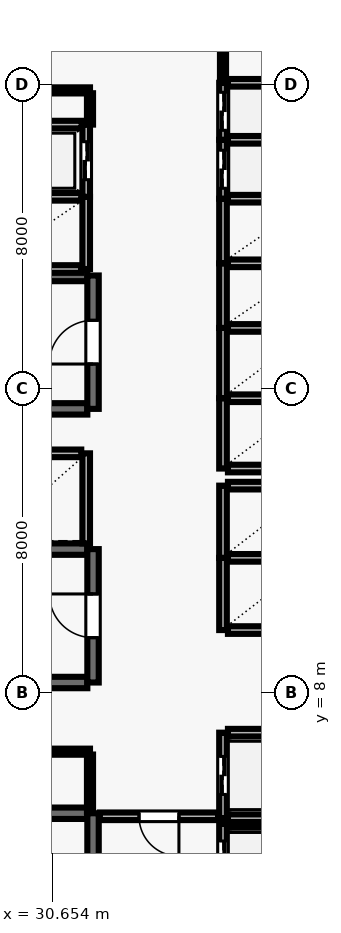
"""IFC4 building model, lengths in metres.
Left out: names, types, materials, properties, quantities, classifications, styles, units other than length and angle.
Written with IfcOpenShell. Run it as: python <this file> out.ifc"""

import sys

from ifc_helpers import new_model, si_unit, direction, frame, frame_2d, origin, place, context, subcontext, project, spatial, rectangle, extrude, element, fill, save


model = new_model("IFC4")
c1 = context("Model", 3, precision=1e-05, world=origin(), true_north=direction((0.0, 1.0)))
c2 = subcontext(c1, "Body", "Model", "MODEL_VIEW")
j1 = project(units=[si_unit("LENGTHUNIT", "METRE"), si_unit("PLANEANGLEUNIT", "RADIAN")], contexts=[c1])
p1 = place(None, origin())
s1 = spatial("IfcSite", under=j1, at=p1, CompositionType="ELEMENT")
p2 = place(p1, origin())
s2 = spatial("IfcBuilding", under=s1, at=p2, CompositionType="ELEMENT")
p3 = place(p2, frame((0.0, 0.0, 38.8)))
s3 = spatial("IfcBuildingStorey", under=s2, at=p3, CompositionType="ELEMENT", Elevation=38.8)
p4 = place(p3, frame((31.58, 4.83, 0.0), z_axis=(0.0, 0.0, 1.0), x_axis=(-1.0, 0.0, 0.0)))
e1 = element("IfcWall", 1, at=p4, inside=s3, PredefinedType="SHEAR", context=c2, shape_type="SweptSolid", body=[
    extrude(rectangle(XDim=8.36, YDim=0.3, at=frame_2d((4.18, 0.0))), origin(), (0.0, 0.0, 1.0), 3.69),
])
p5 = place(p3, frame((31.73, 0.96, 0.0), z_axis=(0.0, 0.0, 1.0), x_axis=(0.0, 1.0, 0.0)))
e2 = element("IfcWall", 2, at=p5, inside=s3, PredefinedType="SHEAR", context=c2, shape_type="SweptSolid", body=[
    extrude(rectangle(XDim=3.87, YDim=0.3, at=frame_2d((1.935, 0.0))), origin(), (0.0, 0.0, 1.0), 3.69),
])
p6 = place(p5, frame((1.54, 0.0, 0.0)))
e3 = element("IfcOpeningElement", 3, at=p6, cuts=e2, PredefinedType="OPENING", context=c2, shape_type="SweptSolid", body=[
    extrude(rectangle(XDim=1.15, YDim=2.15, at=frame_2d((0.575, 1.075))), frame((0.0, 0.16, 0.0), z_axis=(0.0, -1.0, 0.0), x_axis=(1.0, 0.0, 0.0)), (0.0, 0.0, 1.0), 0.32),
])
for number, where, z_axis, x_axis in (
    (4, (31.58, 18.98, 0.0), (0.0, 0.0, 1.0), (-1.0, 0.0, 0.0)),
    (5, (23.22, 15.47, 0.0), (0.0, 0.0, 1.0), (1.0, 0.0, 0.0)),
):
    element("IfcWall", number, at=place(p3, frame(where, z_axis=z_axis, x_axis=x_axis)), inside=s3, PredefinedType="SHEAR", context=c2, shape_type="SweptSolid", body=[
        extrude(rectangle(XDim=8.36, YDim=0.3, at=frame_2d((4.18, 0.0))), origin(), (0.0, 0.0, 1.0), 3.69),
    ])
p7 = place(p3, frame((31.73, 15.47, 0.0), z_axis=(0.0, 0.0, 1.0), x_axis=(0.0, 1.0, 0.0)))
e6 = element("IfcWall", 6, at=p7, inside=s3, PredefinedType="SHEAR", context=c2, shape_type="SweptSolid", body=[
    extrude(rectangle(XDim=3.51, YDim=0.3, at=frame_2d((1.755, 0.0))), origin(), (0.0, 0.0, 1.0), 3.69),
])
p8 = place(p7, frame((1.18, 0.0, 0.0)))
e7 = element("IfcOpeningElement", 7, at=p8, cuts=e6, PredefinedType="OPENING", context=c2, shape_type="SweptSolid", body=[
    extrude(rectangle(XDim=1.15, YDim=2.15, at=frame_2d((0.575, 1.075))), frame((0.0, 0.16, 0.0), z_axis=(0.0, -1.0, 0.0), x_axis=(1.0, 0.0, 0.0)), (0.0, 0.0, 1.0), 0.32),
])
for number, where, z_axis, x_axis in (
    (8, (31.58, 11.78, 0.0), (0.0, 0.0, 1.0), (-1.0, 0.0, 0.0)),
    (9, (23.22, 8.27, 0.0), (0.0, 0.0, 1.0), (1.0, 0.0, 0.0)),
):
    element("IfcWall", number, at=place(p3, frame(where, z_axis=z_axis, x_axis=x_axis)), inside=s3, PredefinedType="SHEAR", context=c2, shape_type="SweptSolid", body=[
        extrude(rectangle(XDim=8.36, YDim=0.3, at=frame_2d((4.18, 0.0))), origin(), (0.0, 0.0, 1.0), 3.69),
    ])
p9 = place(p3, frame((31.73, 8.27, 0.0), z_axis=(0.0, 0.0, 1.0), x_axis=(0.0, 1.0, 0.0)))
e10 = element("IfcWall", 10, at=p9, inside=s3, PredefinedType="SHEAR", context=c2, shape_type="SweptSolid", body=[
    extrude(rectangle(XDim=3.51, YDim=0.3, at=frame_2d((1.755, 0.0))), origin(), (0.0, 0.0, 1.0), 3.69),
])
p10 = place(p9, frame((1.18, 0.0, 0.0)))
e11 = element("IfcOpeningElement", 11, at=p10, cuts=e10, PredefinedType="OPENING", context=c2, shape_type="SweptSolid", body=[
    extrude(rectangle(XDim=1.15, YDim=2.15, at=frame_2d((0.575, 1.075))), frame((0.0, 0.16, 0.0), z_axis=(0.0, -1.0, 0.0), x_axis=(1.0, 0.0, 0.0)), (0.0, 0.0, 1.0), 0.32),
])
p11 = place(p3, frame((35.15, 4.55, 0.0), z_axis=(0.0, 0.0, 1.0), x_axis=(0.0, -1.0, 0.0)))
e12 = element("IfcWall", 12, at=p11, inside=s3, PredefinedType="SOLIDWALL", context=c2, shape_type="SweptSolid", body=[
    extrude(rectangle(XDim=2.1, YDim=0.2, at=frame_2d((1.05, 0.0))), origin(), (0.0, 0.0, 1.0), 3.69),
])
p12 = place(p11, frame((0.45, 0.0, 0.0)))
e13 = element("IfcOpeningElement", 13, at=p12, cuts=e12, PredefinedType="OPENING", context=c2, shape_type="SweptSolid", body=[
    extrude(rectangle(XDim=1.2, YDim=2.15, at=frame_2d((0.6, 1.075))), frame((0.0, 0.11, 0.0), z_axis=(0.0, -1.0, 0.0), x_axis=(1.0, 0.0, 0.0)), (0.0, 0.0, 1.0), 0.22),
])
p13 = place(p3, frame((37.42, 4.55, 0.0), z_axis=(0.0, 0.0, 1.0), x_axis=(-1.0, 0.0, 0.0)))
e14 = element("IfcWall", 14, at=p13, inside=s3, PredefinedType="SOLIDWALL", context=c2, shape_type="SweptSolid", body=[
    extrude(rectangle(XDim=2.14, YDim=0.2, at=frame_2d((1.07, 0.0))), origin(), (0.0, 0.0, 1.0), 3.69),
])
p14 = place(p3, frame((35.15, 6.95, 0.0), z_axis=(0.0, 0.0, 1.0), x_axis=(0.0, -1.0, 0.0)))
e15 = element("IfcWall", 15, at=p14, inside=s3, PredefinedType="SOLIDWALL", context=c2, shape_type="SweptSolid", body=[
    extrude(rectangle(XDim=2.25, YDim=0.2, at=frame_2d((1.125, 0.0))), origin(), (0.0, 0.0, 1.0), 3.69),
])
p15 = place(p14, frame((0.625, 0.0, 0.0)))
e16 = element("IfcOpeningElement", 16, at=p15, cuts=e15, PredefinedType="OPENING", context=c2, shape_type="SweptSolid", body=[
    extrude(rectangle(XDim=1.0, YDim=2.1, at=frame_2d((0.5, 1.05))), frame((0.0, 0.11, 0.0), z_axis=(0.0, -1.0, 0.0), x_axis=(1.0, 0.0, 0.0)), (0.0, 0.0, 1.0), 0.22),
])
for number, where, z_axis, x_axis in (
    (17, (35.28, 4.7, 0.0), (0.0, 0.0, 1.0), (1.0, 0.0, 0.0)),
    (18, (37.42, 6.95, 0.0), (0.0, 0.0, 1.0), (-1.0, 0.0, 0.0)),
):
    element("IfcWall", number, at=place(p3, frame(where, z_axis=z_axis, x_axis=x_axis)), inside=s3, PredefinedType="SOLIDWALL", context=c2, shape_type="SweptSolid", body=[
        extrude(rectangle(XDim=2.14, YDim=0.2, at=frame_2d((1.07, 0.0))), origin(), (0.0, 0.0, 1.0), 3.69),
    ])
p16 = place(p3, frame((35.15, 11.55, 0.0), z_axis=(0.0, 0.0, 1.0), x_axis=(0.0, -1.0, 0.0)))
e19 = element("IfcWall", 19, at=p16, inside=s3, PredefinedType="SOLIDWALL", context=c2, shape_type="SweptSolid", body=[
    extrude(rectangle(XDim=1.9, YDim=0.2, at=frame_2d((0.95, 0.0))), origin(), (0.0, 0.0, 1.0), 3.69),
])
for number, where, z_axis, x_axis in (
    (20, (35.28, 9.65, 0.0), (0.0, 0.0, 1.0), (1.0, 0.0, 0.0)),
    (21, (37.42, 11.55, 0.0), (0.0, 0.0, 1.0), (-1.0, 0.0, 0.0)),
):
    element("IfcWall", number, at=place(p3, frame(where, z_axis=z_axis, x_axis=x_axis)), inside=s3, PredefinedType="SOLIDWALL", context=c2, shape_type="SweptSolid", body=[
        extrude(rectangle(XDim=2.14, YDim=0.2, at=frame_2d((1.07, 0.0))), origin(), (0.0, 0.0, 1.0), 3.69),
    ])
p17 = place(p3, frame((35.15, 13.45, 0.0), z_axis=(0.0, 0.0, 1.0), x_axis=(0.0, -1.0, 0.0)))
e22 = element("IfcWall", 22, at=p17, inside=s3, PredefinedType="SOLIDWALL", context=c2, shape_type="SweptSolid", body=[
    extrude(rectangle(XDim=1.9, YDim=0.2, at=frame_2d((0.95, 0.0))), origin(), (0.0, 0.0, 1.0), 3.69),
])
p18 = place(p3, frame((37.42, 13.45, 0.0), z_axis=(0.0, 0.0, 1.0), x_axis=(-1.0, 0.0, 0.0)))
e23 = element("IfcWall", 23, at=p18, inside=s3, PredefinedType="SOLIDWALL", context=c2, shape_type="SweptSolid", body=[
    extrude(rectangle(XDim=2.14, YDim=0.2, at=frame_2d((1.07, 0.0))), origin(), (0.0, 0.0, 1.0), 3.69),
])
p19 = place(p3, frame((31.55, 11.93, 0.0), z_axis=(0.0, 0.0, 1.0), x_axis=(0.0, 1.0, 0.0)))
e24 = element("IfcWall", 24, at=p19, inside=s3, PredefinedType="SOLIDWALL", context=c2, shape_type="SweptSolid", body=[
    extrude(rectangle(XDim=2.37, YDim=0.2, at=frame_2d((1.185, 0.0))), origin(), (0.0, 0.0, 1.0), 3.69),
])
p20 = place(p3, frame((31.42, 14.3, 0.0), z_axis=(0.0, 0.0, 1.0), x_axis=(-1.0, 0.0, 0.0)))
e25 = element("IfcWall", 25, at=p20, inside=s3, PredefinedType="SOLIDWALL", context=c2, shape_type="SweptSolid", body=[
    extrude(rectangle(XDim=2.44, YDim=0.2, at=frame_2d((1.22, 0.0))), origin(), (0.0, 0.0, 1.0), 3.69),
])
p21 = place(p3, frame((35.15, 15.75, 0.0), z_axis=(0.0, 0.0, 1.0), x_axis=(0.0, -1.0, 0.0)))
e26 = element("IfcWall", 26, at=p21, inside=s3, PredefinedType="SOLIDWALL", context=c2, shape_type="SweptSolid", body=[
    extrude(rectangle(XDim=1.85, YDim=0.2, at=frame_2d((0.925, 0.0))), origin(), (0.0, 0.0, 1.0), 3.69),
])
for number, where, z_axis, x_axis in (
    (27, (35.28, 13.9, 0.0), (0.0, 0.0, 1.0), (1.0, 0.0, 0.0)),
    (28, (37.42, 15.75, 0.0), (0.0, 0.0, 1.0), (-1.0, 0.0, 0.0)),
):
    element("IfcWall", number, at=place(p3, frame(where, z_axis=z_axis, x_axis=x_axis)), inside=s3, PredefinedType="SOLIDWALL", context=c2, shape_type="SweptSolid", body=[
        extrude(rectangle(XDim=2.14, YDim=0.2, at=frame_2d((1.07, 0.0))), origin(), (0.0, 0.0, 1.0), 3.69),
    ])
p22 = place(p3, frame((35.15, 17.6, 0.0), z_axis=(0.0, 0.0, 1.0), x_axis=(0.0, -1.0, 0.0)))
e29 = element("IfcWall", 29, at=p22, inside=s3, PredefinedType="SOLIDWALL", context=c2, shape_type="SweptSolid", body=[
    extrude(rectangle(XDim=1.85, YDim=0.2, at=frame_2d((0.925, 0.0))), origin(), (0.0, 0.0, 1.0), 3.69),
])
p23 = place(p3, frame((37.42, 17.6, 0.0), z_axis=(0.0, 0.0, 1.0), x_axis=(-1.0, 0.0, 0.0)))
e30 = element("IfcWall", 30, at=p23, inside=s3, PredefinedType="SOLIDWALL", context=c2, shape_type="SweptSolid", body=[
    extrude(rectangle(XDim=2.14, YDim=0.2, at=frame_2d((1.07, 0.0))), origin(), (0.0, 0.0, 1.0), 3.69),
])
p24 = place(p3, frame((35.15, 19.3, 0.0), z_axis=(0.0, 0.0, 1.0), x_axis=(0.0, -1.0, 0.0)))
e31 = element("IfcWall", 31, at=p24, inside=s3, PredefinedType="SOLIDWALL", context=c2, shape_type="SweptSolid", body=[
    extrude(rectangle(XDim=1.7, YDim=0.2, at=frame_2d((0.85, 0.0))), origin(), (0.0, 0.0, 1.0), 3.69),
])
p25 = place(p3, frame((37.42, 19.3, 0.0), z_axis=(0.0, 0.0, 1.0), x_axis=(-1.0, 0.0, 0.0)))
e32 = element("IfcWall", 32, at=p25, inside=s3, PredefinedType="SOLIDWALL", context=c2, shape_type="SweptSolid", body=[
    extrude(rectangle(XDim=2.14, YDim=0.2, at=frame_2d((1.07, 0.0))), origin(), (0.0, 0.0, 1.0), 3.69),
])
p26 = place(p3, frame((35.15, 21.0, 0.0), z_axis=(0.0, 0.0, 1.0), x_axis=(0.0, -1.0, 0.0)))
e33 = element("IfcWall", 33, at=p26, inside=s3, PredefinedType="SOLIDWALL", context=c2, shape_type="SweptSolid", body=[
    extrude(rectangle(XDim=1.7, YDim=0.2, at=frame_2d((0.85, 0.0))), origin(), (0.0, 0.0, 1.0), 3.69),
])
p27 = place(p3, frame((37.42, 21.0, 0.0), z_axis=(0.0, 0.0, 1.0), x_axis=(-1.0, 0.0, 0.0)))
e34 = element("IfcWall", 34, at=p27, inside=s3, PredefinedType="SOLIDWALL", context=c2, shape_type="SweptSolid", body=[
    extrude(rectangle(XDim=2.14, YDim=0.2, at=frame_2d((1.07, 0.0))), origin(), (0.0, 0.0, 1.0), 3.69),
])
p28 = place(p3, frame((31.55, 19.15, 0.0), z_axis=(0.0, 0.0, 1.0), x_axis=(0.0, 1.0, 0.0)))
e35 = element("IfcWall", 35, at=p28, inside=s3, PredefinedType="SOLIDWALL", context=c2, shape_type="SweptSolid", body=[
    extrude(rectangle(XDim=1.9, YDim=0.2, at=frame_2d((0.95, 0.0))), origin(), (0.0, 0.0, 1.0), 3.69),
])
for number, where, z_axis, x_axis in (
    (36, (28.98, 19.15, 0.0), (0.0, 0.0, 1.0), (1.0, 0.0, 0.0)),
    (37, (31.42, 21.05, 0.0), (0.0, 0.0, 1.0), (-1.0, 0.0, 0.0)),
):
    element("IfcWall", number, at=place(p3, frame(where, z_axis=z_axis, x_axis=x_axis)), inside=s3, PredefinedType="SOLIDWALL", context=c2, shape_type="SweptSolid", body=[
        extrude(rectangle(XDim=2.44, YDim=0.2, at=frame_2d((1.22, 0.0))), origin(), (0.0, 0.0, 1.0), 3.69),
    ])
p29 = place(p3, frame((35.15, 22.55, 0.0), z_axis=(0.0, 0.0, 1.0), x_axis=(0.0, -1.0, 0.0)))
e38 = element("IfcWall", 38, at=p29, inside=s3, PredefinedType="SOLIDWALL", context=c2, shape_type="SweptSolid", body=[
    extrude(rectangle(XDim=1.55, YDim=0.2, at=frame_2d((0.775, 0.0))), origin(), (0.0, 0.0, 1.0), 3.69),
])
p30 = place(p29, frame((0.275, 0.0, 0.0)))
e39 = element("IfcOpeningElement", 39, at=p30, cuts=e38, PredefinedType="OPENING", context=c2, shape_type="SweptSolid", body=[
    extrude(rectangle(XDim=1.0, YDim=2.1, at=frame_2d((0.5, 1.05))), frame((0.0, 0.11, 0.0), z_axis=(0.0, -1.0, 0.0), x_axis=(1.0, 0.0, 0.0)), (0.0, 0.0, 1.0), 0.22),
])
p31 = place(p3, frame((37.42, 22.55, 0.0), z_axis=(0.0, 0.0, 1.0), x_axis=(-1.0, 0.0, 0.0)))
e40 = element("IfcWall", 40, at=p31, inside=s3, PredefinedType="SOLIDWALL", context=c2, shape_type="SweptSolid", body=[
    extrude(rectangle(XDim=2.14, YDim=0.2, at=frame_2d((1.07, 0.0))), origin(), (0.0, 0.0, 1.0), 3.69),
])
p32 = place(p3, frame((35.15, 24.05, 0.0), z_axis=(0.0, 0.0, 1.0), x_axis=(0.0, -1.0, 0.0)))
e41 = element("IfcWall", 41, at=p32, inside=s3, PredefinedType="SOLIDWALL", context=c2, shape_type="SweptSolid", body=[
    extrude(rectangle(XDim=1.5, YDim=0.2, at=frame_2d((0.75, 0.0))), origin(), (0.0, 0.0, 1.0), 3.69),
])
p33 = place(p32, frame((0.25, 0.0, 0.0)))
e42 = element("IfcOpeningElement", 42, at=p33, cuts=e41, PredefinedType="OPENING", context=c2, shape_type="SweptSolid", body=[
    extrude(rectangle(XDim=1.0, YDim=2.1, at=frame_2d((0.5, 1.05))), frame((0.0, 0.11, 0.0), z_axis=(0.0, -1.0, 0.0), x_axis=(1.0, 0.0, 0.0)), (0.0, 0.0, 1.0), 0.22),
])
p34 = place(p3, frame((37.42, 24.05, 0.0), z_axis=(0.0, 0.0, 1.0), x_axis=(-1.0, 0.0, 0.0)))
e43 = element("IfcWall", 43, at=p34, inside=s3, PredefinedType="SOLIDWALL", context=c2, shape_type="SweptSolid", body=[
    extrude(rectangle(XDim=2.14, YDim=0.2, at=frame_2d((1.07, 0.0))), origin(), (0.0, 0.0, 1.0), 3.69),
])
p35 = place(p3, frame((31.55, 21.05, 0.0), z_axis=(0.0, 0.0, 1.0), x_axis=(0.0, 1.0, 0.0)))
e44 = element("IfcWall", 44, at=p35, inside=s3, PredefinedType="SOLIDWALL", context=c2, shape_type="SweptSolid", body=[
    extrude(rectangle(XDim=1.9, YDim=0.2, at=frame_2d((0.95, 0.0))), origin(), (0.0, 0.0, 1.0), 3.69),
])
p36 = place(p35, frame((0.45, 0.0, 0.0)))
e45 = element("IfcOpeningElement", 45, at=p36, cuts=e44, PredefinedType="OPENING", context=c2, shape_type="SweptSolid", body=[
    extrude(rectangle(XDim=1.0, YDim=2.1, at=frame_2d((0.5, 1.05))), frame((0.0, 0.11, 0.0), z_axis=(0.0, -1.0, 0.0), x_axis=(1.0, 0.0, 0.0)), (0.0, 0.0, 1.0), 0.22),
])
p37 = place(p3, frame((31.43, 22.95, 0.0), z_axis=(0.0, 0.0, 1.0), x_axis=(-1.0, 0.0, 0.0)))
e46 = element("IfcWall", 46, at=p37, inside=s3, PredefinedType="SOLIDWALL", context=c2, shape_type="SweptSolid", body=[
    extrude(rectangle(XDim=2.46, YDim=0.2, at=frame_2d((1.23, 0.0))), origin(), (0.0, 0.0, 1.0), 3.69),
])
p38 = place(p3, frame((28.55, 6.45, 0.0), z_axis=(0.0, 0.0, 1.0), x_axis=(1.0, 0.0, 0.0)))
e47 = element("IfcWall", 47, at=p38, inside=s3, PredefinedType="PARTITIONING", context=c2, shape_type="SweptSolid", body=[
    extrude(rectangle(XDim=3.1, YDim=0.16, at=frame_2d((1.55, 0.0))), origin(), (0.0, 0.0, 1.0), 3.69),
])
p39 = place(p38, frame((1.11, 0.0, 0.0)))
e48 = element("IfcOpeningElement", 48, at=p39, cuts=e47, PredefinedType="OPENING", context=c2, shape_type="SweptSolid", body=[
    extrude(rectangle(XDim=0.88, YDim=2.1, at=frame_2d((0.44, 1.05))), frame((0.0, 0.09, 0.0), z_axis=(0.0, -1.0, 0.0), x_axis=(1.0, 0.0, 0.0)), (0.0, 0.0, 1.0), 0.18),
])
p40 = place(p3, frame((28.8, 23.85, 0.0), z_axis=(0.0, 0.0, 1.0), x_axis=(1.0, 0.0, 0.0)))
e49 = element("IfcWall", 49, at=p40, inside=s3, PredefinedType="PARTITIONING", context=c2, shape_type="SweptSolid", body=[
    extrude(rectangle(XDim=2.85, YDim=0.16, at=frame_2d((1.425, 0.0))), origin(), (0.0, 0.0, 1.0), 3.69),
])
p41 = place(p3, frame((35.02, 4.75, 0.0), z_axis=(0.0, 0.0, 1.0), x_axis=(-1.0, 0.0, 0.0)))
e50 = element("IfcWall", 50, at=p41, inside=s3, PredefinedType="SOLIDWALL", context=c2, shape_type="SweptSolid", body=[
    extrude(rectangle(XDim=3.11, YDim=0.2, at=frame_2d((1.555, 0.0))), origin(), (0.0, 0.0, 1.0), 3.69),
])
p42 = place(p41, frame((1.03, 0.0, 0.0)))
e51 = element("IfcOpeningElement", 51, at=p42, cuts=e50, PredefinedType="OPENING", context=c2, shape_type="SweptSolid", body=[
    extrude(rectangle(XDim=1.05, YDim=2.15, at=frame_2d((0.525, 1.075))), frame((0.0, 0.11, 0.0), z_axis=(0.0, -1.0, 0.0), x_axis=(1.0, 0.0, 0.0)), (0.0, 0.0, 1.0), 0.22),
])
p43 = place(p3, frame((31.65, 4.86, 0.0), z_axis=(0.0, 0.0, 1.0), x_axis=(0.0, 1.0, 0.0)))
e52 = element("IfcWall", 52, at=p43, inside=s3, PredefinedType="PARTITIONING", context=c2, shape_type="SweptSolid", body=[
    extrude(rectangle(XDim=1.515, YDim=0.16, at=frame_2d((0.757, 0.0))), origin(), (0.0, 0.0, 1.0), 3.69),
])
p44 = place(p3, frame((31.65, 23.775, 0.0), z_axis=(0.0, 0.0, 1.0), x_axis=(0.0, -1.0, 0.0)))
e53 = element("IfcWall", 53, at=p44, inside=s3, PredefinedType="PARTITIONING", context=c2, shape_type="SweptSolid", body=[
    extrude(rectangle(XDim=0.825, YDim=0.16, at=frame_2d((0.413, 0.0))), origin(), (0.0, 0.0, 1.0), 3.69),
])
p45 = place(p3, frame((35.15, 24.07, 0.0), z_axis=(0.0, 0.0, 1.0), x_axis=(0.0, 1.0, 0.0)))
e54 = element("IfcWall", 54, at=p45, inside=s3, PredefinedType="PARTITIONING", context=c2, shape_type="SweptSolid", body=[
    extrude(rectangle(XDim=1.855, YDim=0.16, at=frame_2d((0.927, 0.0))), origin(), (0.0, 0.0, 1.0), 3.69),
])
p46 = place(p8, origin())
e55 = element("IfcDoor", 55, at=p46, inside=s3, OperationType="SINGLE_SWING_LEFT", PredefinedType="DOOR", context=c2, shape_type="SweptSolid", body=[
    extrude(rectangle(XDim=1.15, YDim=2.15, at=frame_2d((0.575, 1.075))), frame((0.0, 0.025, 0.0), z_axis=(0.0, -1.0, 0.0), x_axis=(1.0, 0.0, 0.0)), (0.0, 0.0, 1.0), 0.05),
])
fill(e7, e55)
p47 = place(p10, origin())
e56 = element("IfcDoor", 56, at=p47, inside=s3, OperationType="SINGLE_SWING_RIGHT", PredefinedType="DOOR", context=c2, shape_type="SweptSolid", body=[
    extrude(rectangle(XDim=1.15, YDim=2.15, at=frame_2d((0.575, 1.075))), frame((0.0, 0.025, 0.0), z_axis=(0.0, -1.0, 0.0), x_axis=(1.0, 0.0, 0.0)), (0.0, 0.0, 1.0), 0.05),
])
fill(e11, e56)
p48 = place(p12, origin())
e57 = element("IfcDoor", 57, at=p48, inside=s3, OperationType="DOUBLE_DOOR_SLIDING", PredefinedType="DOOR", context=c2, shape_type="SweptSolid", body=[
    extrude(rectangle(XDim=1.2, YDim=2.15, at=frame_2d((0.6, 1.075))), frame((0.0, 0.025, 0.0), z_axis=(0.0, -1.0, 0.0), x_axis=(1.0, 0.0, 0.0)), (0.0, 0.0, 1.0), 0.05),
])
fill(e13, e57)
p49 = place(p15, origin())
e58 = element("IfcDoor", 58, at=p49, inside=s3, OperationType="DOUBLE_DOOR_SLIDING", PredefinedType="DOOR", context=c2, shape_type="SweptSolid", body=[
    extrude(rectangle(XDim=1.0, YDim=2.1, at=frame_2d((0.5, 1.05))), frame((0.0, 0.025, 0.0), z_axis=(0.0, -1.0, 0.0), x_axis=(1.0, 0.0, 0.0)), (0.0, 0.0, 1.0), 0.05),
])
fill(e16, e58)
p50 = place(p30, origin())
e59 = element("IfcDoor", 59, at=p50, inside=s3, OperationType="DOUBLE_DOOR_SLIDING", PredefinedType="DOOR", context=c2, shape_type="SweptSolid", body=[
    extrude(rectangle(XDim=1.0, YDim=2.1, at=frame_2d((0.5, 1.05))), frame((0.0, 0.025, 0.0), z_axis=(0.0, -1.0, 0.0), x_axis=(1.0, 0.0, 0.0)), (0.0, 0.0, 1.0), 0.05),
])
fill(e39, e59)
p51 = place(p33, origin())
e60 = element("IfcDoor", 60, at=p51, inside=s3, OperationType="DOUBLE_DOOR_SLIDING", PredefinedType="DOOR", context=c2, shape_type="SweptSolid", body=[
    extrude(rectangle(XDim=1.0, YDim=2.1, at=frame_2d((0.5, 1.05))), frame((0.0, 0.025, 0.0), z_axis=(0.0, -1.0, 0.0), x_axis=(1.0, 0.0, 0.0)), (0.0, 0.0, 1.0), 0.05),
])
fill(e42, e60)
p52 = place(p36, origin())
e61 = element("IfcDoor", 61, at=p52, inside=s3, OperationType="DOUBLE_DOOR_SLIDING", PredefinedType="DOOR", context=c2, shape_type="SweptSolid", body=[
    extrude(rectangle(XDim=1.0, YDim=2.1, at=frame_2d((0.5, 1.05))), frame((0.0, 0.025, 0.0), z_axis=(0.0, -1.0, 0.0), x_axis=(1.0, 0.0, 0.0)), (0.0, 0.0, 1.0), 0.05),
])
fill(e45, e61)
p53 = place(p42, origin())
e62 = element("IfcDoor", 62, at=p53, inside=s3, OperationType="SINGLE_SWING_LEFT", PredefinedType="DOOR", context=c2, shape_type="SweptSolid", body=[
    extrude(rectangle(XDim=1.05, YDim=2.15, at=frame_2d((0.525, 1.075))), frame((0.0, 0.025, 0.0), z_axis=(0.0, -1.0, 0.0), x_axis=(1.0, 0.0, 0.0)), (0.0, 0.0, 1.0), 0.05),
])
fill(e51, e62)
save(model, sys.argv[1])
